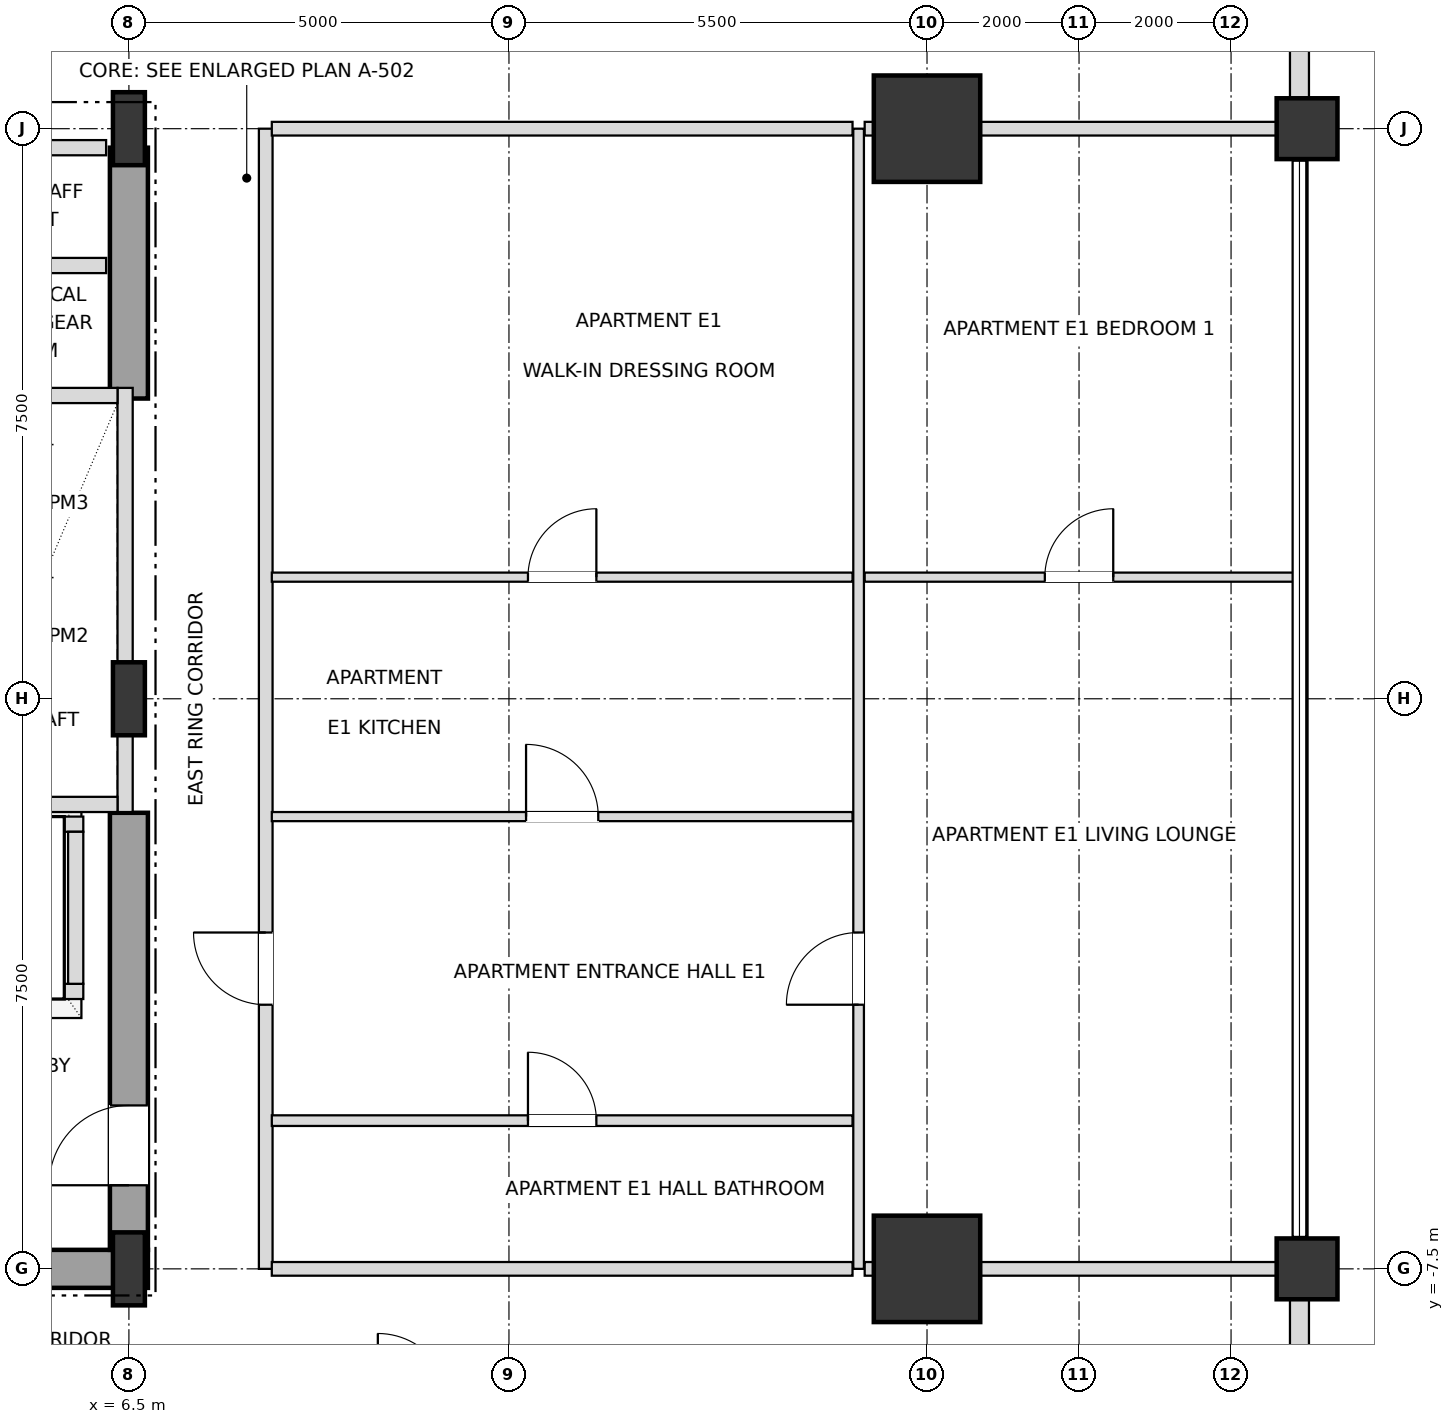
"""IFC4 building model, lengths in metres.
Left out: names, types, materials, properties, quantities, classifications, styles, units other than length and angle.
Written with IfcOpenShell. Run it as: python <this file> out.ifc"""

import sys

from ifc_helpers import new_model, si_unit, direction, frame, frame_2d, origin, origin_2d, place, context, subcontext, project, spatial, rectangle, i_section, extrude, element, fill, save


model = new_model("IFC4")
c1 = context("Model", 3, precision=1e-05, world=origin(), true_north=direction((0.0, 1.0)))
c2 = subcontext(c1, "Body", "Model", "MODEL_VIEW")
j1 = project(units=[si_unit("LENGTHUNIT", "METRE"), si_unit("PLANEANGLEUNIT", "RADIAN")], contexts=[c1])
p1 = place(None, origin())
s1 = spatial("IfcSite", under=j1, at=p1, CompositionType="ELEMENT")
p2 = place(p1, origin())
s2 = spatial("IfcBuilding", under=s1, at=p2, CompositionType="ELEMENT")
p3 = place(p2, frame((0.0, 0.0, 46.8)))
s3 = spatial("IfcBuildingStorey", under=s2, at=p3, CompositionType="ELEMENT", Elevation=46.8)
for number, where, z_axis, x_axis in (
    (1, (6.5, -7.5, 0.0), (0.0, 0.0, 1.0), (1.0, 0.0, 0.0)),
    (2, (6.5, 0.0, 0.0), (0.0, 0.0, 1.0), (1.0, 0.0, 0.0)),
    (3, (6.5, 7.5, 0.0), (0.0, 0.0, 1.0), (1.0, 0.0, 0.0)),
):
    element("IfcColumn", number, at=place(p3, frame(where, z_axis=z_axis, x_axis=x_axis)), inside=s3, PredefinedType="COLUMN", context=c2, shape_type="SweptSolid", body=[
        extrude(i_section(OverallWidth=0.42, OverallDepth=0.96, WebThickness=0.022, FlangeThickness=0.034, at=origin_2d()), origin(), (0.0, 0.0, 1.0), 3.6),
    ])
for number, where, z_axis, x_axis in (
    (4, (17.0, -7.5, 0.0), (0.0, 0.0, 1.0), (1.0, 0.0, 0.0)),
    (5, (17.0, 7.5, 0.0), (0.0, 0.0, 1.0), (1.0, 0.0, 0.0)),
):
    element("IfcColumn", number, at=place(p3, frame(where, z_axis=z_axis, x_axis=x_axis)), inside=s3, PredefinedType="USERDEFINED", context=c2, shape_type="SweptSolid", body=[
        extrude(rectangle(XDim=1.4, YDim=1.4, at=origin_2d()), origin(), (0.0, 0.0, 1.0), 3.6),
    ])
for number, where, z_axis, x_axis in (
    (6, (22.0, -7.5, 0.0), (0.0, 0.0, 1.0), (1.0, 0.0, 0.0)),
    (7, (22.0, 7.5, 0.0), (0.0, 0.0, 1.0), (1.0, 0.0, 0.0)),
):
    element("IfcColumn", number, at=place(p3, frame(where, z_axis=z_axis, x_axis=x_axis)), inside=s3, PredefinedType="COLUMN", context=c2, shape_type="SweptSolid", body=[
        extrude(rectangle(XDim=0.8, YDim=0.8, at=origin_2d()), origin(), (0.0, 0.0, 1.0), 3.6),
    ])
p4 = place(p3, frame((21.9, -12.605, 0.0), z_axis=(0.0, 0.0, 1.0), x_axis=(0.0, 1.0, 0.0)))
e8 = element("IfcWall", 8, at=p4, inside=s3, PredefinedType="SOLIDWALL", context=c2, shape_type="SweptSolid", body=[
    extrude(rectangle(XDim=4.71, YDim=0.25, at=frame_2d((2.355, 0.0))), origin(), (0.0, 0.0, 1.0), 2.736),
])
p5 = place(p4, frame((1.455, 0.0, 0.72)))
e9 = element("IfcOpeningElement", 9, at=p5, cuts=e8, PredefinedType="OPENING", context=c2, shape_type="SweptSolid", body=[
    extrude(rectangle(XDim=1.8, YDim=1.68, at=frame_2d((0.9, 0.84))), frame((0.0, 0.135, 0.0), z_axis=(0.0, -1.0, 0.0), x_axis=(1.0, 0.0, 0.0)), (0.0, 0.0, 1.0), 0.27),
])
p6 = place(p3, frame((21.9, 7.895, 0.0), z_axis=(0.0, 0.0, 1.0), x_axis=(0.0, 1.0, 0.0)))
e10 = element("IfcWall", 10, at=p6, inside=s3, PredefinedType="SOLIDWALL", context=c2, shape_type="SweptSolid", body=[
    extrude(rectangle(XDim=4.71, YDim=0.25, at=frame_2d((2.355, 0.0))), origin(), (0.0, 0.0, 1.0), 2.736),
])
p7 = place(p6, frame((1.455, 0.0, 0.72)))
e11 = element("IfcOpeningElement", 11, at=p7, cuts=e10, PredefinedType="OPENING", context=c2, shape_type="SweptSolid", body=[
    extrude(rectangle(XDim=1.8, YDim=1.68, at=frame_2d((0.9, 0.84))), frame((0.0, 0.135, 0.0), z_axis=(0.0, -1.0, 0.0), x_axis=(1.0, 0.0, 0.0)), (0.0, 0.0, 1.0), 0.27),
])
p8 = place(p3, frame((0.0, -7.5, 0.0), z_axis=(0.0, 0.0, 1.0), x_axis=(1.0, 0.0, 0.0)))
e12 = element("IfcWall", 12, at=p8, inside=s3, PredefinedType="SHEAR", context=c2, shape_type="SweptSolid", body=[
    extrude(rectangle(XDim=6.75, YDim=0.5, at=frame_2d((3.375, 0.0))), origin(), (0.0, 0.0, 1.0), 3.38),
])
p9 = place(p3, frame((6.5, -7.25, 0.0), z_axis=(0.0, 0.0, 1.0), x_axis=(0.0, 1.0, 0.0)))
e13 = element("IfcWall", 13, at=p9, inside=s3, PredefinedType="SHEAR", context=c2, shape_type="SweptSolid", body=[
    extrude(rectangle(XDim=5.75, YDim=0.5, at=frame_2d((2.875, 0.0))), origin(), (0.0, 0.0, 1.0), 3.38),
])
p10 = place(p9, frame((0.85, 0.0, 0.0)))
e14 = element("IfcOpeningElement", 14, at=p10, cuts=e13, PredefinedType="OPENING", context=c2, shape_type="SweptSolid", body=[
    extrude(rectangle(XDim=1.05, YDim=2.15, at=frame_2d((0.525, 1.075))), frame((0.0, 0.26, 0.0), z_axis=(0.0, -1.0, 0.0), x_axis=(1.0, 0.0, 0.0)), (0.0, 0.0, 1.0), 0.52),
])
p11 = place(p3, frame((6.5, 3.95, 0.0), z_axis=(0.0, 0.0, 1.0), x_axis=(0.0, 1.0, 0.0)))
e15 = element("IfcWall", 15, at=p11, inside=s3, PredefinedType="SHEAR", context=c2, shape_type="SweptSolid", body=[
    extrude(rectangle(XDim=3.3, YDim=0.5, at=frame_2d((1.65, 0.0))), origin(), (0.0, 0.0, 1.0), 3.38),
])
p12 = place(p3, frame((6.45, -1.49, 0.0), z_axis=(0.0, 0.0, 1.0), x_axis=(0.0, 1.0, 0.0)))
e16 = element("IfcWall", 16, at=p12, inside=s3, PredefinedType="SOLIDWALL", context=c2, shape_type="SweptSolid", body=[
    extrude(rectangle(XDim=5.58, YDim=0.2, at=frame_2d((2.79, 0.0))), origin(), (0.0, 0.0, 1.0), 2.816),
])
for number, where, z_axis, x_axis in (
    (17, (4.15, -1.39, 0.0), (0.0, 0.0, 1.0), (1.0, 0.0, 0.0)),
    (18, (4.15, 3.99, 0.0), (0.0, 0.0, 1.0), (1.0, 0.0, 0.0)),
):
    element("IfcWall", number, at=place(p3, frame(where, z_axis=z_axis, x_axis=x_axis)), inside=s3, PredefinedType="SOLIDWALL", context=c2, shape_type="SweptSolid", body=[
        extrude(rectangle(XDim=2.2, YDim=0.2, at=frame_2d((1.1, 0.0))), origin(), (0.0, 0.0, 1.0), 3.38),
    ])
p13 = place(p3, frame((1.8, -3.85, 0.0), z_axis=(0.0, 0.0, 1.0), x_axis=(1.0, 0.0, 0.0)))
e19 = element("IfcWall", 19, at=p13, inside=s3, PredefinedType="SOLIDWALL", context=c2, shape_type="SweptSolid", body=[
    extrude(rectangle(XDim=4.1, YDim=0.2, at=frame_2d((2.05, 0.0))), origin(), (0.0, 0.0, 1.0), 3.38),
])
p14 = place(p13, frame((0.45, 0.0, 0.0)))
e20 = element("IfcOpeningElement", 20, at=p14, cuts=e19, PredefinedType="OPENING", context=c2, shape_type="SweptSolid", body=[
    extrude(rectangle(XDim=1.2, YDim=2.2, at=frame_2d((0.6, 1.1))), frame((0.0, 0.11, 0.0), z_axis=(0.0, -1.0, 0.0), x_axis=(1.0, 0.0, 0.0)), (0.0, 0.0, 1.0), 0.22),
])
p15 = place(p13, frame((2.45, 0.0, 0.0)))
e21 = element("IfcOpeningElement", 21, at=p15, cuts=e19, PredefinedType="OPENING", context=c2, shape_type="SweptSolid", body=[
    extrude(rectangle(XDim=1.2, YDim=2.2, at=frame_2d((0.6, 1.1))), frame((0.0, 0.11, 0.0), z_axis=(0.0, -1.0, 0.0), x_axis=(1.0, 0.0, 0.0)), (0.0, 0.0, 1.0), 0.22),
])
p16 = place(p3, frame((1.8, -1.65, 0.0), z_axis=(0.0, 0.0, 1.0), x_axis=(1.0, 0.0, 0.0)))
e22 = element("IfcWall", 22, at=p16, inside=s3, PredefinedType="SOLIDWALL", context=c2, shape_type="SweptSolid", body=[
    extrude(rectangle(XDim=4.1, YDim=0.2, at=frame_2d((2.05, 0.0))), origin(), (0.0, 0.0, 1.0), 3.38),
])
p17 = place(p3, frame((5.8, -3.75, 0.0), z_axis=(0.0, 0.0, 1.0), x_axis=(0.0, 1.0, 0.0)))
e23 = element("IfcWall", 23, at=p17, inside=s3, PredefinedType="SOLIDWALL", context=c2, shape_type="SweptSolid", body=[
    extrude(rectangle(XDim=2.0, YDim=0.2, at=frame_2d((1.0, 0.0))), origin(), (0.0, 0.0, 1.0), 3.38),
])
p18 = place(p3, frame((8.3, -7.5, 0.0), z_axis=(0.0, 0.0, 1.0), x_axis=(0.0, 1.0, 0.0)))
e24 = element("IfcWall", 24, at=p18, inside=s3, PredefinedType="PARTITIONING", context=c2, shape_type="SweptSolid", body=[
    extrude(rectangle(XDim=15.0, YDim=0.18, at=frame_2d((7.5, 0.0))), origin(), (0.0, 0.0, 1.0), 3.38),
])
p19 = place(p18, frame((3.475, 0.0, 0.0)))
e25 = element("IfcOpeningElement", 25, at=p19, cuts=e24, PredefinedType="OPENING", context=c2, shape_type="SweptSolid", body=[
    extrude(rectangle(XDim=0.95, YDim=2.15, at=frame_2d((0.475, 1.075))), frame((0.0, 0.1, 0.0), z_axis=(0.0, -1.0, 0.0), x_axis=(1.0, 0.0, 0.0)), (0.0, 0.0, 1.0), 0.2),
])
p20 = place(p3, frame((16.1, -7.5, 0.0), z_axis=(0.0, 0.0, 1.0), x_axis=(0.0, 1.0, 0.0)))
e26 = element("IfcWall", 26, at=p20, inside=s3, PredefinedType="PARTITIONING", context=c2, shape_type="SweptSolid", body=[
    extrude(rectangle(XDim=15.0, YDim=0.14, at=frame_2d((7.5, 0.0))), origin(), (0.0, 0.0, 1.0), 3.38),
])
p21 = place(p20, frame((3.475, 0.0, 0.0)))
e27 = element("IfcOpeningElement", 27, at=p21, cuts=e26, PredefinedType="OPENING", context=c2, shape_type="SweptSolid", body=[
    extrude(rectangle(XDim=0.95, YDim=2.1, at=frame_2d((0.475, 1.05))), frame((0.0, 0.08, 0.0), z_axis=(0.0, -1.0, 0.0), x_axis=(1.0, 0.0, 0.0)), (0.0, 0.0, 1.0), 0.16),
])
p22 = place(p3, frame((8.38, -7.5, 0.0), z_axis=(0.0, 0.0, 1.0), x_axis=(1.0, 0.0, 0.0)))
e28 = element("IfcWall", 28, at=p22, inside=s3, PredefinedType="PARTITIONING", context=c2, shape_type="SweptSolid", body=[
    extrude(rectangle(XDim=7.64, YDim=0.18, at=frame_2d((3.82, 0.0))), origin(), (0.0, 0.0, 1.0), 2.816),
])
p23 = place(p3, frame((16.18, -7.5, 0.0), z_axis=(0.0, 0.0, 1.0), x_axis=(1.0, 0.0, 0.0)))
e29 = element("IfcWall", 29, at=p23, inside=s3, PredefinedType="PARTITIONING", context=c2, shape_type="SweptSolid", body=[
    extrude(rectangle(XDim=5.72, YDim=0.18, at=frame_2d((2.86, 0.0))), origin(), (0.0, 0.0, 1.0), 2.816),
])
p24 = place(p3, frame((8.38, -5.55, 0.0), z_axis=(0.0, 0.0, 1.0), x_axis=(1.0, 0.0, 0.0)))
e30 = element("IfcWall", 30, at=p24, inside=s3, PredefinedType="PARTITIONING", context=c2, shape_type="SweptSolid", body=[
    extrude(rectangle(XDim=7.64, YDim=0.14, at=frame_2d((3.82, 0.0))), origin(), (0.0, 0.0, 1.0), 2.948),
])
p25 = place(p24, frame((3.37, 0.0, 0.0)))
e31 = element("IfcOpeningElement", 31, at=p25, cuts=e30, PredefinedType="OPENING", context=c2, shape_type="SweptSolid", body=[
    extrude(rectangle(XDim=0.9, YDim=2.1, at=frame_2d((0.45, 1.05))), frame((0.0, 0.08, 0.0), z_axis=(0.0, -1.0, 0.0), x_axis=(1.0, 0.0, 0.0)), (0.0, 0.0, 1.0), 0.16),
])
p26 = place(p3, frame((8.38, -1.55, 0.0), z_axis=(0.0, 0.0, 1.0), x_axis=(1.0, 0.0, 0.0)))
e32 = element("IfcWall", 32, at=p26, inside=s3, PredefinedType="PARTITIONING", context=c2, shape_type="SweptSolid", body=[
    extrude(rectangle(XDim=7.64, YDim=0.12, at=frame_2d((3.82, 0.0))), origin(), (0.0, 0.0, 1.0), 2.948),
])
p27 = place(p26, frame((3.345, 0.0, 0.0)))
e33 = element("IfcOpeningElement", 33, at=p27, cuts=e32, PredefinedType="OPENING", context=c2, shape_type="SweptSolid", body=[
    extrude(rectangle(XDim=0.95, YDim=2.1, at=frame_2d((0.475, 1.05))), frame((0.0, 0.07, 0.0), z_axis=(0.0, -1.0, 0.0), x_axis=(1.0, 0.0, 0.0)), (0.0, 0.0, 1.0), 0.14),
])
p28 = place(p3, frame((8.38, 1.6, 0.0), z_axis=(0.0, 0.0, 1.0), x_axis=(1.0, 0.0, 0.0)))
e34 = element("IfcWall", 34, at=p28, inside=s3, PredefinedType="PARTITIONING", context=c2, shape_type="SweptSolid", body=[
    extrude(rectangle(XDim=7.64, YDim=0.12, at=frame_2d((3.82, 0.0))), origin(), (0.0, 0.0, 1.0), 2.948),
])
p29 = place(p28, frame((3.37, 0.0, 0.0)))
e35 = element("IfcOpeningElement", 35, at=p29, cuts=e34, PredefinedType="OPENING", context=c2, shape_type="SweptSolid", body=[
    extrude(rectangle(XDim=0.9, YDim=2.1, at=frame_2d((0.45, 1.05))), frame((0.0, 0.07, 0.0), z_axis=(0.0, -1.0, 0.0), x_axis=(1.0, 0.0, 0.0)), (0.0, 0.0, 1.0), 0.14),
])
p30 = place(p3, frame((16.18, 1.6, 0.0), z_axis=(0.0, 0.0, 1.0), x_axis=(1.0, 0.0, 0.0)))
e36 = element("IfcWall", 36, at=p30, inside=s3, PredefinedType="PARTITIONING", context=c2, shape_type="SweptSolid", body=[
    extrude(rectangle(XDim=5.64, YDim=0.12, at=frame_2d((2.82, 0.0))), origin(), (0.0, 0.0, 1.0), 2.816),
])
p31 = place(p30, frame((2.37, 0.0, 0.0)))
e37 = element("IfcOpeningElement", 37, at=p31, cuts=e36, PredefinedType="OPENING", context=c2, shape_type="SweptSolid", body=[
    extrude(rectangle(XDim=0.9, YDim=2.1, at=frame_2d((0.45, 1.05))), frame((0.0, 0.07, 0.0), z_axis=(0.0, -1.0, 0.0), x_axis=(1.0, 0.0, 0.0)), (0.0, 0.0, 1.0), 0.14),
])
for number, where, z_axis, x_axis in (
    (38, (4.13, 5.7, 0.0), (0.0, 0.0, 1.0), (1.0, 0.0, 0.0)),
    (39, (4.13, 7.25, 0.0), (0.0, 0.0, 1.0), (1.0, 0.0, 0.0)),
):
    element("IfcWall", number, at=place(p3, frame(where, z_axis=z_axis, x_axis=x_axis)), inside=s3, PredefinedType="SOLIDWALL", context=c2, shape_type="SweptSolid", body=[
        extrude(rectangle(XDim=2.07, YDim=0.2, at=frame_2d((1.035, 0.0))), origin(), (0.0, 0.0, 1.0), 3.38),
    ])
p32 = place(p3, frame((8.38, 7.5, 0.0), z_axis=(0.0, 0.0, 1.0), x_axis=(1.0, 0.0, 0.0)))
e40 = element("IfcWall", 40, at=p32, inside=s3, PredefinedType="PARTITIONING", context=c2, shape_type="SweptSolid", body=[
    extrude(rectangle(XDim=7.64, YDim=0.18, at=frame_2d((3.82, 0.0))), origin(), (0.0, 0.0, 1.0), 2.816),
])
p33 = place(p3, frame((16.18, 7.5, 0.0), z_axis=(0.0, 0.0, 1.0), x_axis=(1.0, 0.0, 0.0)))
e41 = element("IfcWall", 41, at=p33, inside=s3, PredefinedType="PARTITIONING", context=c2, shape_type="SweptSolid", body=[
    extrude(rectangle(XDim=5.72, YDim=0.18, at=frame_2d((2.86, 0.0))), origin(), (0.0, 0.0, 1.0), 2.816),
])
p34 = place(p10, origin())
e42 = element("IfcDoor", 42, at=p34, inside=s3, OperationType="SINGLE_SWING_LEFT", PredefinedType="DOOR", context=c2, shape_type="SweptSolid", body=[
    extrude(rectangle(XDim=1.05, YDim=2.15, at=frame_2d((0.525, 1.075))), frame((0.0, 0.025, 0.0), z_axis=(0.0, -1.0, 0.0), x_axis=(1.0, 0.0, 0.0)), (0.0, 0.0, 1.0), 0.05),
])
fill(e14, e42)
p35 = place(p25, origin())
e43 = element("IfcDoor", 43, at=p35, inside=s3, OperationType="SINGLE_SWING_LEFT", PredefinedType="DOOR", context=c2, shape_type="SweptSolid", body=[
    extrude(rectangle(XDim=0.9, YDim=2.1, at=frame_2d((0.45, 1.05))), frame((0.0, 0.025, 0.0), z_axis=(0.0, -1.0, 0.0), x_axis=(1.0, 0.0, 0.0)), (0.0, 0.0, 1.0), 0.05),
])
fill(e31, e43)
p36 = place(p19, origin())
e44 = element("IfcDoor", 44, at=p36, inside=s3, OperationType="SINGLE_SWING_RIGHT", PredefinedType="DOOR", context=c2, shape_type="SweptSolid", body=[
    extrude(rectangle(XDim=0.95, YDim=2.15, at=frame_2d((0.475, 1.075))), frame((0.0, 0.025, 0.0), z_axis=(0.0, -1.0, 0.0), x_axis=(1.0, 0.0, 0.0)), (0.0, 0.0, 1.0), 0.05),
])
fill(e25, e44)
p37 = place(p27, origin())
e45 = element("IfcDoor", 45, at=p37, inside=s3, OperationType="SINGLE_SWING_LEFT", PredefinedType="DOOR", context=c2, shape_type="SweptSolid", body=[
    extrude(rectangle(XDim=0.95, YDim=2.1, at=frame_2d((0.475, 1.05))), frame((0.0, 0.025, 0.0), z_axis=(0.0, -1.0, 0.0), x_axis=(1.0, 0.0, 0.0)), (0.0, 0.0, 1.0), 0.05),
])
fill(e33, e45)
p38 = place(p29, origin())
e46 = element("IfcDoor", 46, at=p38, inside=s3, OperationType="SINGLE_SWING_RIGHT", PredefinedType="DOOR", context=c2, shape_type="SweptSolid", body=[
    extrude(rectangle(XDim=0.9, YDim=2.1, at=frame_2d((0.45, 1.05))), frame((0.0, 0.025, 0.0), z_axis=(0.0, -1.0, 0.0), x_axis=(1.0, 0.0, 0.0)), (0.0, 0.0, 1.0), 0.05),
])
fill(e35, e46)
p39 = place(p21, origin())
e47 = element("IfcDoor", 47, at=p39, inside=s3, OperationType="SINGLE_SWING_LEFT", PredefinedType="DOOR", context=c2, shape_type="SweptSolid", body=[
    extrude(rectangle(XDim=0.95, YDim=2.1, at=frame_2d((0.475, 1.05))), frame((0.0, 0.025, 0.0), z_axis=(0.0, -1.0, 0.0), x_axis=(1.0, 0.0, 0.0)), (0.0, 0.0, 1.0), 0.05),
])
fill(e27, e47)
p40 = place(p31, origin())
e48 = element("IfcDoor", 48, at=p40, inside=s3, OperationType="SINGLE_SWING_RIGHT", PredefinedType="DOOR", context=c2, shape_type="SweptSolid", body=[
    extrude(rectangle(XDim=0.9, YDim=2.1, at=frame_2d((0.45, 1.05))), frame((0.0, 0.025, 0.0), z_axis=(0.0, -1.0, 0.0), x_axis=(1.0, 0.0, 0.0)), (0.0, 0.0, 1.0), 0.05),
])
fill(e37, e48)
save(model, sys.argv[1])
